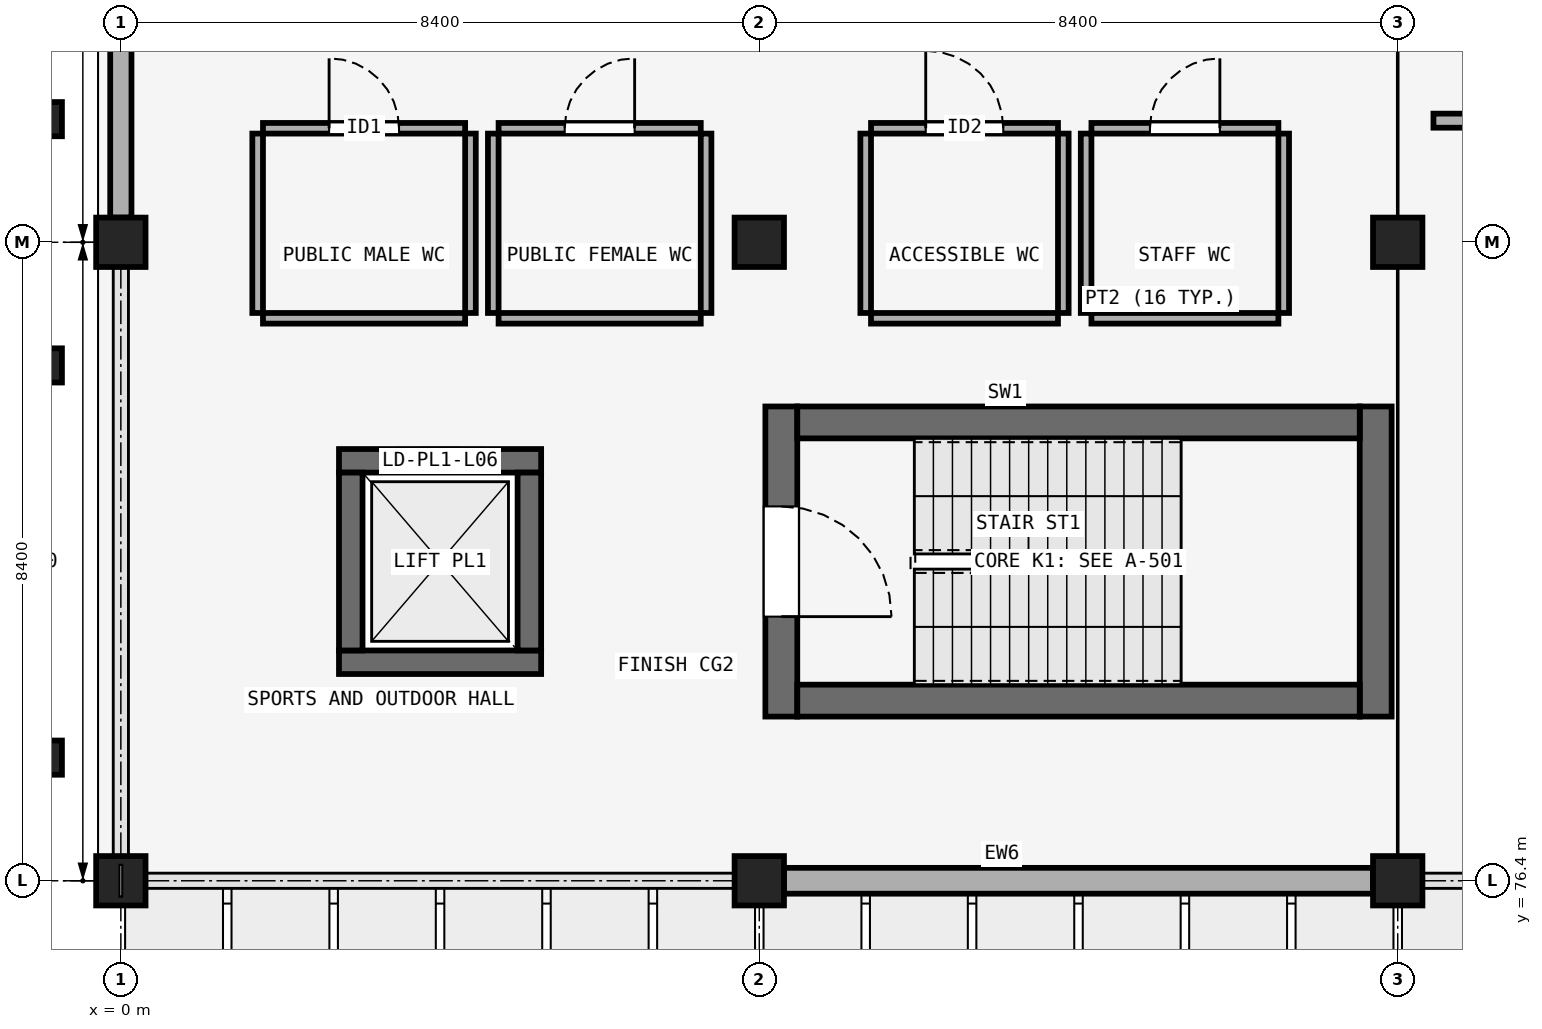
"""IFC4 building model, lengths in metres.
Left out: names, types, materials, properties, quantities, classifications, styles, units other than length and angle.
Written with IfcOpenShell. Run it as: python <this file> out.ifc"""

import sys

from ifc_helpers import new_model, si_unit, direction, frame, frame_2d, origin, origin_2d, place, context, subcontext, project, spatial, rectangle, extrude, element, fill, save


model = new_model("IFC4")
c1 = context("Model", 3, precision=1e-05, world=origin(), true_north=direction((0.0, 1.0)))
c2 = subcontext(c1, "Body", "Model", "MODEL_VIEW")
j1 = project(units=[si_unit("LENGTHUNIT", "METRE"), si_unit("PLANEANGLEUNIT", "RADIAN")], contexts=[c1])
p1 = place(None, origin())
s1 = spatial("IfcSite", under=j1, at=p1, CompositionType="ELEMENT")
p2 = place(p1, origin())
s2 = spatial("IfcBuilding", under=s1, at=p2, CompositionType="ELEMENT")
p3 = place(p2, frame((0.0, 0.0, 27.9)))
s3 = spatial("IfcBuildingStorey", under=s2, at=p3, CompositionType="ELEMENT", Elevation=27.9)
for number, where, z_axis, x_axis in (
    (1, (0.0, 76.4, 0.0), (0.0, 0.0, 1.0), (1.0, 0.0, 0.0)),
    (2, (8.4, 76.4, 0.0), (0.0, 0.0, 1.0), (1.0, 0.0, 0.0)),
    (3, (16.8, 76.4, 0.0), (0.0, 0.0, 1.0), (1.0, 0.0, 0.0)),
    (4, (0.0, 84.8, 0.0), (0.0, 0.0, 1.0), (1.0, 0.0, 0.0)),
    (5, (8.4, 84.8, 0.0), (0.0, 0.0, 1.0), (1.0, 0.0, 0.0)),
    (6, (16.8, 84.8, 0.0), (0.0, 0.0, 1.0), (1.0, 0.0, 0.0)),
):
    element("IfcColumn", number, at=place(p3, frame(where, z_axis=z_axis, x_axis=x_axis)), inside=s3, PredefinedType="COLUMN", context=c2, shape_type="SweptSolid", body=[
        extrude(rectangle(XDim=0.65, YDim=0.65, at=origin_2d()), origin(), (0.0, 0.0, 1.0), 4.5),
    ])
for number, where, z_axis, x_axis in (
    (7, (-1.05, 78.02, 0.0), (0.0, 0.0, 1.0), (0.0, 1.0, 0.0)),
    (8, (-1.05, 83.18, 0.0), (0.0, 0.0, 1.0), (0.0, 1.0, 0.0)),
    (9, (-1.05, 86.42, 0.0), (0.0, 0.0, 1.0), (0.0, 1.0, 0.0)),
):
    element("IfcColumn", number, at=place(p3, frame(where, z_axis=z_axis, x_axis=x_axis)), inside=s3, PredefinedType="PILASTER", context=c2, shape_type="SweptSolid", body=[
        extrude(rectangle(XDim=0.45, YDim=0.55, at=origin_2d()), origin(), (0.0, 0.0, 1.0), 4.5),
    ])
p4 = place(p3, frame((8.725, 76.4, 0.0), z_axis=(0.0, 0.0, 1.0), x_axis=(1.0, 0.0, 0.0)))
e10 = element("IfcWall", 10, at=p4, inside=s3, PredefinedType="SOLIDWALL", context=c2, shape_type="SweptSolid", body=[
    extrude(rectangle(XDim=7.75, YDim=0.34, at=frame_2d((3.875, 0.0))), origin(), (0.0, 0.0, 1.0), 1.74),
])
p5 = place(p3, frame((0.0, 85.125, 0.0), z_axis=(0.0, 0.0, 1.0), x_axis=(0.0, 1.0, 0.0)))
e11 = element("IfcWall", 11, at=p5, inside=s3, PredefinedType="SOLIDWALL", context=c2, shape_type="SweptSolid", body=[
    extrude(rectangle(XDim=7.75, YDim=0.28, at=frame_2d((3.875, 0.0))), origin(), (0.0, 0.0, 1.0), 3.45),
])
p6 = place(p5, frame((2.8, 0.0, 0.95)))
e12 = element("IfcOpeningElement", 12, at=p6, cuts=e11, PredefinedType="OPENING", context=c2, shape_type="SweptSolid", body=[
    extrude(rectangle(XDim=2.15, YDim=1.35, at=frame_2d((1.075, 0.675))), frame((0.0, 0.15, 0.0), z_axis=(0.0, -1.0, 0.0), x_axis=(1.0, 0.0, 0.0)), (0.0, 0.0, 1.0), 0.3),
])
p7 = place(p3, frame((8.69, 82.64, 0.0), z_axis=(0.0, 0.0, 1.0), x_axis=(0.0, -1.0, 0.0)))
e13 = element("IfcWall", 13, at=p7, inside=s3, PredefinedType="SHEAR", context=c2, shape_type="SweptSolid", body=[
    extrude(rectangle(XDim=4.08, YDim=0.42, at=frame_2d((2.04, 0.0))), origin(), (0.0, 0.0, 1.0), 4.2),
])
p8 = place(p7, frame((1.315, 0.0, 0.0)))
e14 = element("IfcOpeningElement", 14, at=p8, cuts=e13, PredefinedType="OPENING", context=c2, shape_type="SweptSolid", body=[
    extrude(rectangle(XDim=1.45, YDim=2.2, at=frame_2d((0.725, 1.1))), frame((0.0, 0.22, 0.0), z_axis=(0.0, -1.0, 0.0), x_axis=(1.0, 0.0, 0.0)), (0.0, 0.0, 1.0), 0.44),
])
p9 = place(p3, frame((16.51, 78.56, 0.0), z_axis=(0.0, 0.0, 1.0), x_axis=(0.0, 1.0, 0.0)))
e15 = element("IfcWall", 15, at=p9, inside=s3, PredefinedType="SHEAR", context=c2, shape_type="SweptSolid", body=[
    extrude(rectangle(XDim=4.08, YDim=0.42, at=frame_2d((2.04, 0.0))), origin(), (0.0, 0.0, 1.0), 4.2),
])
for number, where, z_axis, x_axis in (
    (16, (8.9, 78.77, 0.0), (0.0, 0.0, 1.0), (1.0, 0.0, 0.0)),
    (17, (8.9, 82.43, 0.0), (0.0, 0.0, 1.0), (1.0, 0.0, 0.0)),
):
    element("IfcWall", number, at=place(p3, frame(where, z_axis=z_axis, x_axis=x_axis)), inside=s3, PredefinedType="SHEAR", context=c2, shape_type="SweptSolid", body=[
        extrude(rectangle(XDim=7.4, YDim=0.42, at=frame_2d((3.7, 0.0))), origin(), (0.0, 0.0, 1.0), 4.2),
    ])
p10 = place(p3, frame((2.87, 79.275, 0.0), z_axis=(0.0, 0.0, 1.0), x_axis=(1.0, 0.0, 0.0)))
e18 = element("IfcWall", 18, at=p10, inside=s3, PredefinedType="SHEAR", context=c2, shape_type="SweptSolid", body=[
    extrude(rectangle(XDim=2.66, YDim=0.31, at=frame_2d((1.33, 0.0))), origin(), (0.0, 0.0, 1.0), 4.2),
])
p11 = place(p3, frame((2.87, 81.925, 0.0), z_axis=(0.0, 0.0, 1.0), x_axis=(1.0, 0.0, 0.0)))
e19 = element("IfcWall", 19, at=p11, inside=s3, PredefinedType="SHEAR", context=c2, shape_type="SweptSolid", body=[
    extrude(rectangle(XDim=2.66, YDim=0.31, at=frame_2d((1.33, 0.0))), origin(), (0.0, 0.0, 1.0), 4.2),
])
p12 = place(p11, frame((0.78, 0.0, 0.0)))
e20 = element("IfcOpeningElement", 20, at=p12, cuts=e19, PredefinedType="OPENING", context=c2, shape_type="SweptSolid", body=[
    extrude(rectangle(XDim=1.1, YDim=2.2, at=frame_2d((0.55, 1.1))), frame((0.0, 0.165, 0.0), z_axis=(0.0, -1.0, 0.0), x_axis=(1.0, 0.0, 0.0)), (0.0, 0.0, 1.0), 0.33),
])
for number, where, z_axis, x_axis in (
    (21, (3.025, 79.43, 0.0), (0.0, 0.0, 1.0), (0.0, 1.0, 0.0)),
    (22, (5.375, 79.43, 0.0), (0.0, 0.0, 1.0), (0.0, 1.0, 0.0)),
):
    element("IfcWall", number, at=place(p3, frame(where, z_axis=z_axis, x_axis=x_axis)), inside=s3, PredefinedType="SHEAR", context=c2, shape_type="SweptSolid", body=[
        extrude(rectangle(XDim=2.34, YDim=0.31, at=frame_2d((1.17, 0.0))), origin(), (0.0, 0.0, 1.0), 4.2),
    ])
p13 = place(p3, frame((1.87, 86.3, 0.0), z_axis=(0.0, 0.0, 1.0), x_axis=(1.0, 0.0, 0.0)))
e23 = element("IfcWall", 23, at=p13, inside=s3, PredefinedType="PARTITIONING", context=c2, shape_type="SweptSolid", body=[
    extrude(rectangle(XDim=2.66, YDim=0.14, at=frame_2d((1.33, 0.0))), origin(), (0.0, 0.0, 1.0), 4.2),
])
p14 = place(p13, frame((0.87, 0.0, 0.0)))
e24 = element("IfcOpeningElement", 24, at=p14, cuts=e23, PredefinedType="OPENING", context=c2, shape_type="SweptSolid", body=[
    extrude(rectangle(XDim=0.92, YDim=2.12, at=frame_2d((0.46, 1.06))), frame((0.0, 0.08, 0.0), z_axis=(0.0, -1.0, 0.0), x_axis=(1.0, 0.0, 0.0)), (0.0, 0.0, 1.0), 0.16),
])
p15 = place(p3, frame((1.87, 83.8, 0.0), z_axis=(0.0, 0.0, 1.0), x_axis=(1.0, 0.0, 0.0)))
e25 = element("IfcWall", 25, at=p15, inside=s3, PredefinedType="PARTITIONING", context=c2, shape_type="SweptSolid", body=[
    extrude(rectangle(XDim=2.66, YDim=0.14, at=frame_2d((1.33, 0.0))), origin(), (0.0, 0.0, 1.0), 4.2),
])
for number, where, z_axis, x_axis in (
    (26, (1.8, 83.87, 0.0), (0.0, 0.0, 1.0), (0.0, 1.0, 0.0)),
    (27, (4.6, 83.87, 0.0), (0.0, 0.0, 1.0), (0.0, 1.0, 0.0)),
):
    element("IfcWall", number, at=place(p3, frame(where, z_axis=z_axis, x_axis=x_axis)), inside=s3, PredefinedType="PARTITIONING", context=c2, shape_type="SweptSolid", body=[
        extrude(rectangle(XDim=2.36, YDim=0.14, at=frame_2d((1.18, 0.0))), origin(), (0.0, 0.0, 1.0), 3.45),
    ])
p16 = place(p3, frame((4.97, 86.3, 0.0), z_axis=(0.0, 0.0, 1.0), x_axis=(1.0, 0.0, 0.0)))
e28 = element("IfcWall", 28, at=p16, inside=s3, PredefinedType="PARTITIONING", context=c2, shape_type="SweptSolid", body=[
    extrude(rectangle(XDim=2.66, YDim=0.14, at=frame_2d((1.33, 0.0))), origin(), (0.0, 0.0, 1.0), 4.2),
])
p17 = place(p16, frame((0.87, 0.0, 0.0)))
e29 = element("IfcOpeningElement", 29, at=p17, cuts=e28, PredefinedType="OPENING", context=c2, shape_type="SweptSolid", body=[
    extrude(rectangle(XDim=0.92, YDim=2.12, at=frame_2d((0.46, 1.06))), frame((0.0, 0.08, 0.0), z_axis=(0.0, -1.0, 0.0), x_axis=(1.0, 0.0, 0.0)), (0.0, 0.0, 1.0), 0.16),
])
p18 = place(p3, frame((4.97, 83.8, 0.0), z_axis=(0.0, 0.0, 1.0), x_axis=(1.0, 0.0, 0.0)))
e30 = element("IfcWall", 30, at=p18, inside=s3, PredefinedType="PARTITIONING", context=c2, shape_type="SweptSolid", body=[
    extrude(rectangle(XDim=2.66, YDim=0.14, at=frame_2d((1.33, 0.0))), origin(), (0.0, 0.0, 1.0), 4.2),
])
for number, where, z_axis, x_axis in (
    (31, (4.9, 83.87, 0.0), (0.0, 0.0, 1.0), (0.0, 1.0, 0.0)),
    (32, (7.7, 83.87, 0.0), (0.0, 0.0, 1.0), (0.0, 1.0, 0.0)),
):
    element("IfcWall", number, at=place(p3, frame(where, z_axis=z_axis, x_axis=x_axis)), inside=s3, PredefinedType="PARTITIONING", context=c2, shape_type="SweptSolid", body=[
        extrude(rectangle(XDim=2.36, YDim=0.14, at=frame_2d((1.18, 0.0))), origin(), (0.0, 0.0, 1.0), 3.45),
    ])
p19 = place(p3, frame((9.87, 86.3, 0.0), z_axis=(0.0, 0.0, 1.0), x_axis=(1.0, 0.0, 0.0)))
e33 = element("IfcWall", 33, at=p19, inside=s3, PredefinedType="PARTITIONING", context=c2, shape_type="SweptSolid", body=[
    extrude(rectangle(XDim=2.46, YDim=0.14, at=frame_2d((1.23, 0.0))), origin(), (0.0, 0.0, 1.0), 4.2),
])
p20 = place(p19, frame((0.72, 0.0, 0.0)))
e34 = element("IfcOpeningElement", 34, at=p20, cuts=e33, PredefinedType="OPENING", context=c2, shape_type="SweptSolid", body=[
    extrude(rectangle(XDim=1.02, YDim=2.15, at=frame_2d((0.51, 1.075))), frame((0.0, 0.08, 0.0), z_axis=(0.0, -1.0, 0.0), x_axis=(1.0, 0.0, 0.0)), (0.0, 0.0, 1.0), 0.16),
])
p21 = place(p3, frame((9.87, 83.8, 0.0), z_axis=(0.0, 0.0, 1.0), x_axis=(1.0, 0.0, 0.0)))
e35 = element("IfcWall", 35, at=p21, inside=s3, PredefinedType="PARTITIONING", context=c2, shape_type="SweptSolid", body=[
    extrude(rectangle(XDim=2.46, YDim=0.14, at=frame_2d((1.23, 0.0))), origin(), (0.0, 0.0, 1.0), 4.2),
])
for number, where, z_axis, x_axis in (
    (36, (9.8, 83.87, 0.0), (0.0, 0.0, 1.0), (0.0, 1.0, 0.0)),
    (37, (12.4, 83.87, 0.0), (0.0, 0.0, 1.0), (0.0, 1.0, 0.0)),
):
    element("IfcWall", number, at=place(p3, frame(where, z_axis=z_axis, x_axis=x_axis)), inside=s3, PredefinedType="PARTITIONING", context=c2, shape_type="SweptSolid", body=[
        extrude(rectangle(XDim=2.36, YDim=0.14, at=frame_2d((1.18, 0.0))), origin(), (0.0, 0.0, 1.0), 3.45),
    ])
p22 = place(p3, frame((12.77, 86.3, 0.0), z_axis=(0.0, 0.0, 1.0), x_axis=(1.0, 0.0, 0.0)))
e38 = element("IfcWall", 38, at=p22, inside=s3, PredefinedType="PARTITIONING", context=c2, shape_type="SweptSolid", body=[
    extrude(rectangle(XDim=2.46, YDim=0.14, at=frame_2d((1.23, 0.0))), origin(), (0.0, 0.0, 1.0), 4.2),
])
p23 = place(p22, frame((0.77, 0.0, 0.0)))
e39 = element("IfcOpeningElement", 39, at=p23, cuts=e38, PredefinedType="OPENING", context=c2, shape_type="SweptSolid", body=[
    extrude(rectangle(XDim=0.92, YDim=2.12, at=frame_2d((0.46, 1.06))), frame((0.0, 0.08, 0.0), z_axis=(0.0, -1.0, 0.0), x_axis=(1.0, 0.0, 0.0)), (0.0, 0.0, 1.0), 0.16),
])
p24 = place(p3, frame((12.77, 83.8, 0.0), z_axis=(0.0, 0.0, 1.0), x_axis=(1.0, 0.0, 0.0)))
e40 = element("IfcWall", 40, at=p24, inside=s3, PredefinedType="PARTITIONING", context=c2, shape_type="SweptSolid", body=[
    extrude(rectangle(XDim=2.46, YDim=0.14, at=frame_2d((1.23, 0.0))), origin(), (0.0, 0.0, 1.0), 4.2),
])
for number, where, z_axis, x_axis in (
    (41, (12.7, 83.87, 0.0), (0.0, 0.0, 1.0), (0.0, 1.0, 0.0)),
    (42, (15.3, 83.87, 0.0), (0.0, 0.0, 1.0), (0.0, 1.0, 0.0)),
):
    element("IfcWall", number, at=place(p3, frame(where, z_axis=z_axis, x_axis=x_axis)), inside=s3, PredefinedType="PARTITIONING", context=c2, shape_type="SweptSolid", body=[
        extrude(rectangle(XDim=2.36, YDim=0.14, at=frame_2d((1.18, 0.0))), origin(), (0.0, 0.0, 1.0), 3.45),
    ])
p25 = place(p3, frame((17.27, 86.4, 0.0), z_axis=(0.0, 0.0, 1.0), x_axis=(1.0, 0.0, 0.0)))
e43 = element("IfcWall", 43, at=p25, inside=s3, PredefinedType="PARTITIONING", context=c2, shape_type="SweptSolid", body=[
    extrude(rectangle(XDim=7.61, YDim=0.185, at=frame_2d((3.805, 0.0))), origin(), (0.0, 0.0, 1.0), 4.2),
])
p26 = place(p8, origin())
e44 = element("IfcDoor", 44, at=p26, inside=s3, OperationType="SINGLE_SWING_RIGHT", PredefinedType="DOOR", context=c2, shape_type="SweptSolid", body=[
    extrude(rectangle(XDim=1.45, YDim=2.2, at=frame_2d((0.725, 1.1))), frame((0.0, 0.025, 0.0), z_axis=(0.0, -1.0, 0.0), x_axis=(1.0, 0.0, 0.0)), (0.0, 0.0, 1.0), 0.05),
])
fill(e14, e44)
p27 = place(p12, origin())
e45 = element("IfcDoor", 45, at=p27, inside=s3, OperationType="SLIDING_TO_LEFT", PredefinedType="DOOR", context=c2, shape_type="SweptSolid", body=[
    extrude(rectangle(XDim=1.1, YDim=2.2, at=frame_2d((0.55, 1.1))), frame((0.0, 0.025, 0.0), z_axis=(0.0, -1.0, 0.0), x_axis=(1.0, 0.0, 0.0)), (0.0, 0.0, 1.0), 0.05),
])
fill(e20, e45)
p28 = place(p14, origin())
e46 = element("IfcDoor", 46, at=p28, inside=s3, OperationType="SINGLE_SWING_LEFT", PredefinedType="DOOR", context=c2, shape_type="SweptSolid", body=[
    extrude(rectangle(XDim=0.92, YDim=2.12, at=frame_2d((0.46, 1.06))), frame((0.0, 0.025, 0.0), z_axis=(0.0, -1.0, 0.0), x_axis=(1.0, 0.0, 0.0)), (0.0, 0.0, 1.0), 0.05),
])
fill(e24, e46)
p29 = place(p17, origin())
e47 = element("IfcDoor", 47, at=p29, inside=s3, OperationType="SINGLE_SWING_RIGHT", PredefinedType="DOOR", context=c2, shape_type="SweptSolid", body=[
    extrude(rectangle(XDim=0.92, YDim=2.12, at=frame_2d((0.46, 1.06))), frame((0.0, 0.025, 0.0), z_axis=(0.0, -1.0, 0.0), x_axis=(1.0, 0.0, 0.0)), (0.0, 0.0, 1.0), 0.05),
])
fill(e29, e47)
p30 = place(p20, origin())
e48 = element("IfcDoor", 48, at=p30, inside=s3, OperationType="SINGLE_SWING_LEFT", PredefinedType="DOOR", context=c2, shape_type="SweptSolid", body=[
    extrude(rectangle(XDim=1.02, YDim=2.15, at=frame_2d((0.51, 1.075))), frame((0.0, 0.025, 0.0), z_axis=(0.0, -1.0, 0.0), x_axis=(1.0, 0.0, 0.0)), (0.0, 0.0, 1.0), 0.05),
])
fill(e34, e48)
p31 = place(p23, origin())
e49 = element("IfcDoor", 49, at=p31, inside=s3, OperationType="SINGLE_SWING_RIGHT", PredefinedType="DOOR", context=c2, shape_type="SweptSolid", body=[
    extrude(rectangle(XDim=0.92, YDim=2.12, at=frame_2d((0.46, 1.06))), frame((0.0, 0.025, 0.0), z_axis=(0.0, -1.0, 0.0), x_axis=(1.0, 0.0, 0.0)), (0.0, 0.0, 1.0), 0.05),
])
fill(e39, e49)
save(model, sys.argv[1])
